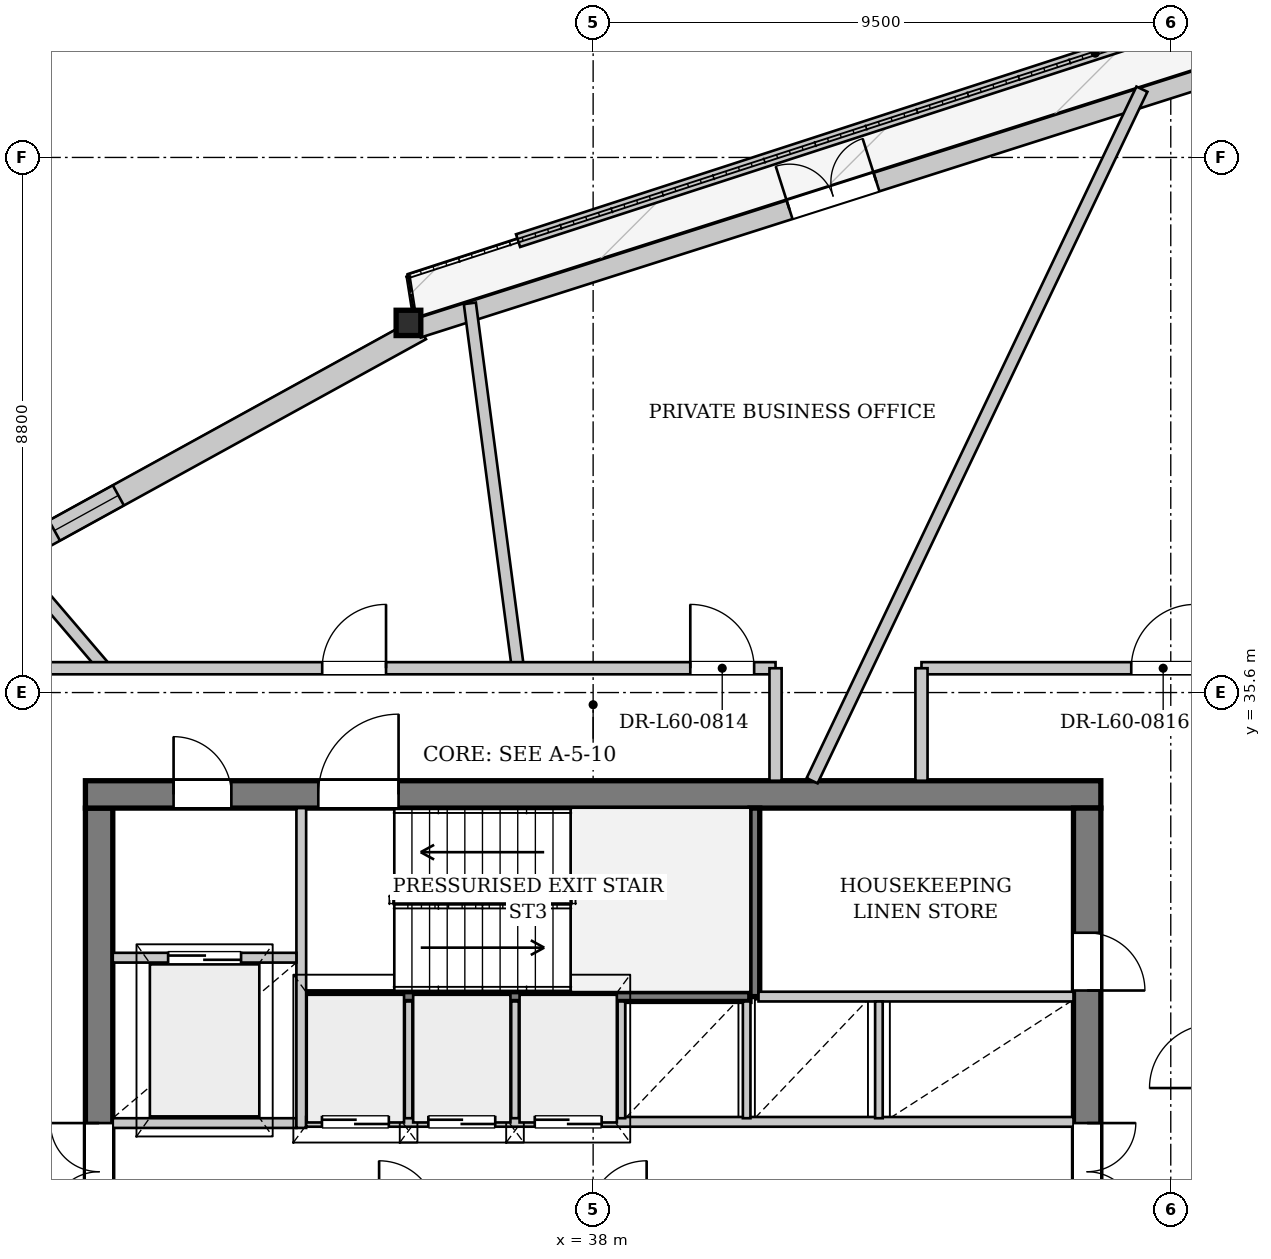
"""IFC4 building model, lengths in metres.
Left out: names, types, materials, properties, quantities, classifications, styles, units other than length and angle.
Written with IfcOpenShell. Run it as: python <this file> out.ifc"""

import sys

from ifc_helpers import new_model, si_unit, direction, frame, frame_2d, origin, origin_2d, place, context, subcontext, project, spatial, rectangle, i_section, extrude, source, transform, mapped, element, fill, save


model = new_model("IFC4")
c1 = context("Model", 3, precision=1e-05, world=origin(), true_north=direction((0.0, 1.0)))
c2 = subcontext(c1, "Body", "Model", "MODEL_VIEW")
j1 = project(units=[si_unit("LENGTHUNIT", "METRE"), si_unit("PLANEANGLEUNIT", "RADIAN")], contexts=[c1])
p1 = place(None, origin())
s1 = spatial("IfcSite", under=j1, at=p1, CompositionType="ELEMENT")
p2 = place(p1, origin())
s2 = spatial("IfcBuilding", under=s1, at=p2, CompositionType="ELEMENT")
p3 = place(p2, frame((0.0, 0.0, 227.35)))
s3 = spatial("IfcBuildingStorey", under=s2, at=p3, CompositionType="ELEMENT", Elevation=227.35)
m1 = source(origin(), c2, "Body", "SweptSolid", [
    extrude(i_section(OverallWidth=0.406, OverallDepth=0.416, WebThickness=0.027, FlangeThickness=0.042, at=origin_2d()), origin(), (0.0, 0.0, 1.0), 3.394),
])
p4 = place(p3, frame((35.068, 41.744, 0.0), z_axis=(-0.062077161408, -0.038339660522, 0.997334696309), x_axis=(0.525471891343, -0.85081096103, 0.0)))
e1 = element("IfcColumn", 1, at=p4, inside=s3, PredefinedType="COLUMN", context=c2, shape_type="MappedRepresentation", body=[
    mapped(m1, transform((0.0, 0.0, 0.0), x_axis=(1.0, 0.0, 0.0), y_axis=(0.0, 1.0, 0.0), z_axis=(0.0, 0.0, 1.0), scale=1.0)),
])
p5 = place(p3, frame((15.539, 30.776, 0.0), z_axis=(0.0, 0.0, 1.0), x_axis=(0.876021364286, 0.482272297892, 0.0)))
e2 = element("IfcWall", 2, at=p5, inside=s3, PredefinedType="SOLIDWALL", context=c2, shape_type="SweptSolid", body=[
    extrude(rectangle(XDim=22.397, YDim=0.38, at=frame_2d((11.199, 0.0))), origin(), (0.0, 0.0, 1.0), 2.822),
])
p6 = place(p5, frame((5.671, 0.0, 0.65)))
e3 = element("IfcOpeningElement", 3, at=p6, cuts=e2, PredefinedType="OPENING", context=c2, shape_type="SweptSolid", body=[
    extrude(rectangle(XDim=1.2, YDim=1.5, at=frame_2d((0.6, 0.75))), frame((0.0, 0.2, 0.0), z_axis=(0.0, -1.0, 0.0), x_axis=(1.0, 0.0, 0.0)), (0.0, 0.0, 1.0), 0.4),
])
p7 = place(p5, frame((15.526, 0.0, 0.65)))
e4 = element("IfcOpeningElement", 4, at=p7, cuts=e2, PredefinedType="OPENING", context=c2, shape_type="SweptSolid", body=[
    extrude(rectangle(XDim=1.2, YDim=1.5, at=frame_2d((0.6, 0.75))), frame((0.0, 0.2, 0.0), z_axis=(0.0, -1.0, 0.0), x_axis=(1.0, 0.0, 0.0)), (0.0, 0.0, 1.0), 0.4),
])
p8 = place(p3, frame((35.117, 41.592, 0.0), z_axis=(0.0, 0.0, 1.0), x_axis=(0.952805881392, 0.303580223968, 0.0)))
e5 = element("IfcWall", 5, at=p8, inside=s3, PredefinedType="SOLIDWALL", context=c2, shape_type="SweptSolid", body=[
    extrude(rectangle(XDim=22.397, YDim=0.32, at=frame_2d((11.199, 0.0))), origin(), (0.0, 0.0, 1.0), 2.822),
])
p9 = place(p8, frame((6.417, 0.0, 0.0)))
e6 = element("IfcOpeningElement", 6, at=p9, cuts=e5, PredefinedType="OPENING", context=c2, shape_type="SweptSolid", body=[
    extrude(rectangle(XDim=1.5, YDim=2.3, at=frame_2d((0.75, 1.15))), frame((0.0, 0.17, 0.0), z_axis=(0.0, -1.0, 0.0), x_axis=(1.0, 0.0, 0.0)), (0.0, 0.0, 1.0), 0.34),
])
p10 = place(p8, frame((15.274, 0.0, 0.352)))
e7 = element("IfcOpeningElement", 7, at=p10, cuts=e5, PredefinedType="OPENING", context=c2, shape_type="SweptSolid", body=[
    extrude(rectangle(XDim=2.6, YDim=2.35, at=frame_2d((1.3, 1.175))), frame((0.0, 0.17, 0.0), z_axis=(0.0, -1.0, 0.0), x_axis=(1.0, 0.0, 0.0)), (0.0, 0.0, 1.0), 0.34),
])
p11 = place(p3, frame((55.749, 49.198, 0.0), z_axis=(0.0, 0.0, 1.0), x_axis=(-0.951088076276, -0.308919845859, 0.0)))
e8 = element("IfcWall", 8, at=p11, inside=s3, PredefinedType="PARAPET", context=c2, shape_type="SweptSolid", body=[
    extrude(rectangle(XDim=19.96, YDim=0.22, at=frame_2d((9.98, 0.0))), origin(), (0.0, 0.0, 1.0), 0.3),
])
p12 = place(p3, frame((29.875, 19.5, 0.0), z_axis=(0.0, 0.0, 1.0), x_axis=(0.0, 1.0, 0.0)))
e9 = element("IfcWall", 9, at=p12, inside=s3, PredefinedType="SHEAR", context=c2, shape_type="SweptSolid", body=[
    extrude(rectangle(XDim=14.2, YDim=0.45, at=frame_2d((7.1, 0.0))), origin(), (0.0, 0.0, 1.0), 3.33),
])
p13 = place(p12, frame((7.42, 0.0, 0.0)))
e10 = element("IfcOpeningElement", 10, at=p13, cuts=e9, PredefinedType="OPENING", context=c2, shape_type="SweptSolid", body=[
    extrude(rectangle(XDim=1.6, YDim=2.2, at=frame_2d((0.8, 1.1))), frame((0.0, 0.235, 0.0), z_axis=(0.0, -1.0, 0.0), x_axis=(1.0, 0.0, 0.0)), (0.0, 0.0, 1.0), 0.47),
])
p14 = place(p3, frame((29.65, 33.925, 0.0), z_axis=(0.0, 0.0, 1.0), x_axis=(1.0, 0.0, 0.0)))
e11 = element("IfcWall", 11, at=p14, inside=s3, PredefinedType="SHEAR", context=c2, shape_type="SweptSolid", body=[
    extrude(rectangle(XDim=16.7, YDim=0.45, at=frame_2d((8.35, 0.0))), origin(), (0.0, 0.0, 1.0), 3.33),
])
p15 = place(p14, frame((1.45, 0.0, 0.0)))
e12 = element("IfcOpeningElement", 12, at=p15, cuts=e11, PredefinedType="OPENING", context=c2, shape_type="SweptSolid", body=[
    extrude(rectangle(XDim=0.95, YDim=2.1, at=frame_2d((0.475, 1.05))), frame((0.0, 0.235, 0.0), z_axis=(0.0, -1.0, 0.0), x_axis=(1.0, 0.0, 0.0)), (0.0, 0.0, 1.0), 0.47),
])
p16 = place(p14, frame((3.83, 0.0, 0.0)))
e13 = element("IfcOpeningElement", 13, at=p16, cuts=e11, PredefinedType="OPENING", context=c2, shape_type="SweptSolid", body=[
    extrude(rectangle(XDim=1.32, YDim=2.2, at=frame_2d((0.66, 1.1))), frame((0.0, 0.235, 0.0), z_axis=(0.0, -1.0, 0.0), x_axis=(1.0, 0.0, 0.0)), (0.0, 0.0, 1.0), 0.47),
])
p17 = place(p3, frame((46.125, 33.7, 0.0), z_axis=(0.0, 0.0, 1.0), x_axis=(0.0, -1.0, 0.0)))
e14 = element("IfcWall", 14, at=p17, inside=s3, PredefinedType="SHEAR", context=c2, shape_type="SweptSolid", body=[
    extrude(rectangle(XDim=14.2, YDim=0.45, at=frame_2d((7.1, 0.0))), origin(), (0.0, 0.0, 1.0), 3.33),
])
p18 = place(p17, frame((5.18, 0.0, 0.0)))
e15 = element("IfcOpeningElement", 15, at=p18, cuts=e14, PredefinedType="OPENING", context=c2, shape_type="SweptSolid", body=[
    extrude(rectangle(XDim=1.6, YDim=2.2, at=frame_2d((0.8, 1.1))), frame((0.0, 0.235, 0.0), z_axis=(0.0, -1.0, 0.0), x_axis=(1.0, 0.0, 0.0)), (0.0, 0.0, 1.0), 0.47),
])
p19 = place(p17, frame((2.05, 0.0, 0.0)))
e16 = element("IfcOpeningElement", 16, at=p19, cuts=e14, PredefinedType="OPENING", context=c2, shape_type="SweptSolid", body=[
    extrude(rectangle(XDim=0.95, YDim=2.1, at=frame_2d((0.475, 1.05))), frame((0.0, 0.235, 0.0), z_axis=(0.0, -1.0, 0.0), x_axis=(1.0, 0.0, 0.0)), (0.0, 0.0, 1.0), 0.47),
])
p20 = place(p3, frame((33.28, 30.6, 0.0), z_axis=(0.0, 0.0, 1.0), x_axis=(1.0, 0.0, 0.0)))
e17 = element("IfcWall", 17, at=p20, inside=s3, PredefinedType="PARTITIONING", context=c2, shape_type="SweptSolid", body=[
    extrude(rectangle(XDim=7.3, YDim=0.16, at=frame_2d((3.65, 0.0))), origin(), (0.0, 0.0, 1.0), 3.33),
])
p21 = place(p3, frame((40.66, 30.6, 0.0), z_axis=(0.0, 0.0, 1.0), x_axis=(0.0, 1.0, 0.0)))
e18 = element("IfcWall", 18, at=p21, inside=s3, PredefinedType="PARTITIONING", context=c2, shape_type="SweptSolid", body=[
    extrude(rectangle(XDim=3.1, YDim=0.16, at=frame_2d((1.55, 0.0))), origin(), (0.0, 0.0, 1.0), 3.33),
])
p22 = place(p3, frame((30.1, 28.52, 0.0), z_axis=(0.0, 0.0, 1.0), x_axis=(1.0, 0.0, 0.0)))
e19 = element("IfcWall", 19, at=p22, inside=s3, PredefinedType="PARTITIONING", context=c2, shape_type="SweptSolid", body=[
    extrude(rectangle(XDim=3.02, YDim=0.16, at=frame_2d((1.51, 0.0))), origin(), (0.0, 0.0, 1.0), 3.33),
])
p23 = place(p3, frame((33.2, 28.44, 0.0), z_axis=(0.0, 0.0, 1.0), x_axis=(0.0, 1.0, 0.0)))
e20 = element("IfcWall", 20, at=p23, inside=s3, PredefinedType="PARTITIONING", context=c2, shape_type="SweptSolid", body=[
    extrude(rectangle(XDim=5.26, YDim=0.16, at=frame_2d((2.63, 0.0))), origin(), (0.0, 0.0, 1.0), 3.33),
])
p24 = place(p3, frame((30.1, 31.24, 0.0), z_axis=(0.0, 0.0, 1.0), x_axis=(1.0, 0.0, 0.0)))
e21 = element("IfcWall", 21, at=p24, inside=s3, PredefinedType="PARTITIONING", context=c2, shape_type="SweptSolid", body=[
    extrude(rectangle(XDim=3.02, YDim=0.16, at=frame_2d((1.51, 0.0))), origin(), (0.0, 0.0, 1.0), 3.33),
])
p25 = place(p24, frame((0.91, 0.0, 0.0)))
e22 = element("IfcOpeningElement", 22, at=p25, cuts=e21, PredefinedType="OPENING", context=c2, shape_type="SweptSolid", body=[
    extrude(rectangle(XDim=1.2, YDim=2.2, at=frame_2d((0.6, 1.1))), frame((0.0, 0.09, 0.0), z_axis=(0.0, -1.0, 0.0), x_axis=(1.0, 0.0, 0.0)), (0.0, 0.0, 1.0), 0.18),
])
p26 = place(p3, frame((33.28, 28.54, 0.0), z_axis=(0.0, 0.0, 1.0), x_axis=(1.0, 0.0, 0.0)))
e23 = element("IfcWall", 23, at=p26, inside=s3, PredefinedType="PARTITIONING", context=c2, shape_type="SweptSolid", body=[
    extrude(rectangle(XDim=12.62, YDim=0.16, at=frame_2d((6.31, 0.0))), origin(), (0.0, 0.0, 1.0), 3.33),
])
p27 = place(p26, frame((0.26, 0.0, 0.0)))
e24 = element("IfcOpeningElement", 24, at=p27, cuts=e23, PredefinedType="OPENING", context=c2, shape_type="SweptSolid", body=[
    extrude(rectangle(XDim=1.1, YDim=2.2, at=frame_2d((0.55, 1.1))), frame((0.0, 0.09, 0.0), z_axis=(0.0, -1.0, 0.0), x_axis=(1.0, 0.0, 0.0)), (0.0, 0.0, 1.0), 0.18),
])
p28 = place(p26, frame((2.01, 0.0, 0.0)))
e25 = element("IfcOpeningElement", 25, at=p28, cuts=e23, PredefinedType="OPENING", context=c2, shape_type="SweptSolid", body=[
    extrude(rectangle(XDim=1.1, YDim=2.2, at=frame_2d((0.55, 1.1))), frame((0.0, 0.09, 0.0), z_axis=(0.0, -1.0, 0.0), x_axis=(1.0, 0.0, 0.0)), (0.0, 0.0, 1.0), 0.18),
])
p29 = place(p26, frame((3.76, 0.0, 0.0)))
e26 = element("IfcOpeningElement", 26, at=p29, cuts=e23, PredefinedType="OPENING", context=c2, shape_type="SweptSolid", body=[
    extrude(rectangle(XDim=1.1, YDim=2.2, at=frame_2d((0.55, 1.1))), frame((0.0, 0.09, 0.0), z_axis=(0.0, -1.0, 0.0), x_axis=(1.0, 0.0, 0.0)), (0.0, 0.0, 1.0), 0.18),
])
p30 = place(p3, frame((40.72, 30.6, 0.0), z_axis=(0.0, 0.0, 1.0), x_axis=(1.0, 0.0, 0.0)))
e27 = element("IfcWall", 27, at=p30, inside=s3, PredefinedType="PARTITIONING", context=c2, shape_type="SweptSolid", body=[
    extrude(rectangle(XDim=5.18, YDim=0.16, at=frame_2d((2.59, 0.0))), origin(), (0.0, 0.0, 1.0), 3.33),
])
for number, where, z_axis, x_axis in (
    (28, (34.965, 28.6, 0.0), (0.0, 0.0, 1.0), (0.0, 1.0, 0.0)),
    (29, (36.715, 28.6, 0.0), (0.0, 0.0, 1.0), (0.0, 1.0, 0.0)),
    (30, (38.465, 28.6, 0.0), (0.0, 0.0, 1.0), (0.0, 1.0, 0.0)),
    (31, (40.525, 28.6, 0.0), (0.0, 0.0, 1.0), (0.0, 1.0, 0.0)),
    (32, (42.7, 28.6, 0.0), (0.0, 0.0, 1.0), (0.0, 1.0, 0.0)),
):
    element("IfcWall", number, at=place(p3, frame(where, z_axis=z_axis, x_axis=x_axis)), inside=s3, PredefinedType="PARTITIONING", context=c2, shape_type="SweptSolid", body=[
        extrude(rectangle(XDim=1.92, YDim=0.125, at=frame_2d((0.96, 0.0))), origin(), (0.0, 0.0, 1.0), 3.33),
    ])
p31 = place(p3, frame((41.601, 34.15, 0.0), z_axis=(0.0, 0.0, 1.0), x_axis=(0.430503610469, 0.902588855112, 0.0)))
e33 = element("IfcWall", 33, at=p31, inside=s3, PredefinedType="PARTITIONING", context=c2, shape_type="SweptSolid", body=[
    extrude(rectangle(XDim=12.6, YDim=0.2, at=frame_2d((6.3, 0.0))), origin(), (0.0, 0.0, 1.0), 3.33),
])
p32 = place(p3, frame((36.762, 36.0, 0.0), z_axis=(0.0, 0.0, 1.0), x_axis=(-0.130530683029, 0.991444270137, 0.0)))
e34 = element("IfcWall", 34, at=p32, inside=s3, PredefinedType="PARTITIONING", context=c2, shape_type="SweptSolid", body=[
    extrude(rectangle(XDim=6.052, YDim=0.2, at=frame_2d((3.026, 0.0))), origin(), (0.0, 0.0, 1.0), 3.33),
])
p33 = place(p3, frame((29.972, 36.0, 0.0), z_axis=(0.0, 0.0, 1.0), x_axis=(-0.649428113656, 0.760422990968, 0.0)))
e35 = element("IfcWall", 35, at=p33, inside=s3, PredefinedType="PARTITIONING", context=c2, shape_type="SweptSolid", body=[
    extrude(rectangle(XDim=2.598, YDim=0.2, at=frame_2d((1.299, 0.0))), origin(), (0.0, 0.0, 1.0), 3.33),
])
p34 = place(p3, frame((27.8, 36.0, 0.0), z_axis=(0.0, 0.0, 1.0), x_axis=(1.0, 0.0, 0.0)))
e36 = element("IfcWall", 36, at=p34, inside=s3, PredefinedType="PARTITIONING", context=c2, shape_type="SweptSolid", body=[
    extrude(rectangle(XDim=13.2, YDim=0.2, at=frame_2d((6.6, 0.0))), origin(), (0.0, 0.0, 1.0), 3.33),
])
p35 = place(p34, frame((11.798, 0.0, 0.0)))
e37 = element("IfcOpeningElement", 37, at=p35, cuts=e36, PredefinedType="OPENING", context=c2, shape_type="SweptSolid", body=[
    extrude(rectangle(XDim=1.05, YDim=2.2, at=frame_2d((0.525, 1.1))), frame((0.0, 0.11, 0.0), z_axis=(0.0, -1.0, 0.0), x_axis=(1.0, 0.0, 0.0)), (0.0, 0.0, 1.0), 0.22),
])
p36 = place(p34, frame((5.744, 0.0, 0.0)))
e38 = element("IfcOpeningElement", 38, at=p36, cuts=e36, PredefinedType="OPENING", context=c2, shape_type="SweptSolid", body=[
    extrude(rectangle(XDim=1.05, YDim=2.2, at=frame_2d((0.525, 1.1))), frame((0.0, 0.11, 0.0), z_axis=(0.0, -1.0, 0.0), x_axis=(1.0, 0.0, 0.0)), (0.0, 0.0, 1.0), 0.22),
])
p37 = place(p3, frame((41.0, 34.15, 0.0), z_axis=(0.0, 0.0, 1.0), x_axis=(0.0, 1.0, 0.0)))
e39 = element("IfcWall", 39, at=p37, inside=s3, PredefinedType="PARTITIONING", context=c2, shape_type="SweptSolid", body=[
    extrude(rectangle(XDim=1.85, YDim=0.2, at=frame_2d((0.925, 0.0))), origin(), (0.0, 0.0, 1.0), 3.33),
])
p38 = place(p3, frame((43.4, 36.0, 0.0), z_axis=(0.0, 0.0, 1.0), x_axis=(1.0, 0.0, 0.0)))
e40 = element("IfcWall", 40, at=p38, inside=s3, PredefinedType="PARTITIONING", context=c2, shape_type="SweptSolid", body=[
    extrude(rectangle(XDim=4.8, YDim=0.2, at=frame_2d((2.4, 0.0))), origin(), (0.0, 0.0, 1.0), 3.33),
])
p39 = place(p38, frame((3.45, 0.0, 0.0)))
e41 = element("IfcOpeningElement", 41, at=p39, cuts=e40, PredefinedType="OPENING", context=c2, shape_type="SweptSolid", body=[
    extrude(rectangle(XDim=1.05, YDim=2.2, at=frame_2d((0.525, 1.1))), frame((0.0, 0.11, 0.0), z_axis=(0.0, -1.0, 0.0), x_axis=(1.0, 0.0, 0.0)), (0.0, 0.0, 1.0), 0.22),
])
p40 = place(p3, frame((43.4, 34.15, 0.0), z_axis=(0.0, 0.0, 1.0), x_axis=(0.0, 1.0, 0.0)))
e42 = element("IfcWall", 42, at=p40, inside=s3, PredefinedType="PARTITIONING", context=c2, shape_type="SweptSolid", body=[
    extrude(rectangle(XDim=1.85, YDim=0.2, at=frame_2d((0.925, 0.0))), origin(), (0.0, 0.0, 1.0), 3.33),
])
m2 = source(origin(), c2, "Body", "SweptSolid", [
    extrude(rectangle(XDim=1.2, YDim=1.5, at=frame_2d((0.6, 0.75))), frame((0.0, 0.03, 0.0), z_axis=(0.0, -1.0, 0.0), x_axis=(1.0, 0.0, 0.0)), (0.0, 0.0, 1.0), 0.06),
])
p41 = place(p7, origin())
e43 = element("IfcWindow", 43, at=p41, inside=s3, PartitioningType="SINGLE_PANEL", PredefinedType="WINDOW", context=c2, shape_type="MappedRepresentation", body=[
    mapped(m2, transform((0.0, 0.0, 0.0), x_axis=(1.0, 0.0, 0.0), y_axis=(0.0, 1.0, 0.0), z_axis=(0.0, 0.0, 1.0), scale=1.0)),
])
fill(e4, e43)
m3 = source(origin(), c2, "Body", "SweptSolid", [
    extrude(rectangle(XDim=1.5, YDim=2.3, at=frame_2d((0.75, 1.15))), frame((0.0, 0.025, 0.0), z_axis=(0.0, -1.0, 0.0), x_axis=(1.0, 0.0, 0.0)), (0.0, 0.0, 1.0), 0.05),
])
p42 = place(p9, origin())
e44 = element("IfcDoor", 44, at=p42, inside=s3, OperationType="DOUBLE_DOOR_SINGLE_SWING", PredefinedType="DOOR", context=c2, shape_type="MappedRepresentation", body=[
    mapped(m3, transform((0.0, 0.0, 0.0), x_axis=(1.0, 0.0, 0.0), y_axis=(0.0, 1.0, 0.0), z_axis=(0.0, 0.0, 1.0), scale=1.0)),
])
fill(e6, e44)
m4 = source(origin(), c2, "Body", "SweptSolid", [
    extrude(rectangle(XDim=1.6, YDim=2.2, at=frame_2d((0.8, 1.1))), frame((0.0, 0.025, 0.0), z_axis=(0.0, -1.0, 0.0), x_axis=(1.0, 0.0, 0.0)), (0.0, 0.0, 1.0), 0.05),
])
p43 = place(p13, origin())
e45 = element("IfcDoor", 45, at=p43, inside=s3, OperationType="DOUBLE_DOOR_SINGLE_SWING", PredefinedType="DOOR", context=c2, shape_type="MappedRepresentation", body=[
    mapped(m4, transform((0.0, 0.0, 0.0), x_axis=(1.0, 0.0, 0.0), y_axis=(0.0, 1.0, 0.0), z_axis=(0.0, 0.0, 1.0), scale=1.0)),
])
fill(e10, e45)
m5 = source(origin(), c2, "Body", "SweptSolid", [
    extrude(rectangle(XDim=0.95, YDim=2.1, at=frame_2d((0.475, 1.05))), frame((0.0, 0.025, 0.0), z_axis=(0.0, -1.0, 0.0), x_axis=(1.0, 0.0, 0.0)), (0.0, 0.0, 1.0), 0.05),
])
p44 = place(p15, origin())
e46 = element("IfcDoor", 46, at=p44, inside=s3, OperationType="SINGLE_SWING_LEFT", PredefinedType="DOOR", context=c2, shape_type="MappedRepresentation", body=[
    mapped(m5, transform((0.0, 0.0, 0.0), x_axis=(1.0, 0.0, 0.0), y_axis=(0.0, 1.0, 0.0), z_axis=(0.0, 0.0, 1.0), scale=1.0)),
])
fill(e12, e46)
m6 = source(origin(), c2, "Body", "SweptSolid", [
    extrude(rectangle(XDim=1.32, YDim=2.2, at=frame_2d((0.66, 1.1))), frame((0.0, 0.025, 0.0), z_axis=(0.0, -1.0, 0.0), x_axis=(1.0, 0.0, 0.0)), (0.0, 0.0, 1.0), 0.05),
])
p45 = place(p16, origin())
e47 = element("IfcDoor", 47, at=p45, inside=s3, OperationType="SINGLE_SWING_RIGHT", PredefinedType="DOOR", context=c2, shape_type="MappedRepresentation", body=[
    mapped(m6, transform((0.0, 0.0, 0.0), x_axis=(1.0, 0.0, 0.0), y_axis=(0.0, 1.0, 0.0), z_axis=(0.0, 0.0, 1.0), scale=1.0)),
])
fill(e13, e47)
p46 = place(p18, origin())
e48 = element("IfcDoor", 48, at=p46, inside=s3, OperationType="DOUBLE_DOOR_SINGLE_SWING", PredefinedType="DOOR", context=c2, shape_type="MappedRepresentation", body=[
    mapped(m4, transform((0.0, 0.0, 0.0), x_axis=(1.0, 0.0, 0.0), y_axis=(0.0, 1.0, 0.0), z_axis=(0.0, 0.0, 1.0), scale=1.0)),
])
fill(e15, e48)
m7 = source(origin(), c2, "Body", "SweptSolid", [
    extrude(rectangle(XDim=1.2, YDim=2.2, at=frame_2d((0.6, 1.1))), frame((0.0, 0.025, 0.0), z_axis=(0.0, -1.0, 0.0), x_axis=(1.0, 0.0, 0.0)), (0.0, 0.0, 1.0), 0.05),
])
p47 = place(p25, origin())
e49 = element("IfcDoor", 49, at=p47, inside=s3, OperationType="DOUBLE_DOOR_SLIDING", PredefinedType="DOOR", context=c2, shape_type="MappedRepresentation", body=[
    mapped(m7, transform((0.0, 0.0, 0.0), x_axis=(1.0, 0.0, 0.0), y_axis=(0.0, 1.0, 0.0), z_axis=(0.0, 0.0, 1.0), scale=1.0)),
])
fill(e22, e49)
m8 = source(origin(), c2, "Body", "SweptSolid", [
    extrude(rectangle(XDim=1.1, YDim=2.2, at=frame_2d((0.55, 1.1))), frame((0.0, 0.025, 0.0), z_axis=(0.0, -1.0, 0.0), x_axis=(1.0, 0.0, 0.0)), (0.0, 0.0, 1.0), 0.05),
])
p48 = place(p27, origin())
e50 = element("IfcDoor", 50, at=p48, inside=s3, OperationType="DOUBLE_DOOR_SLIDING", PredefinedType="DOOR", context=c2, shape_type="MappedRepresentation", body=[
    mapped(m8, transform((0.0, 0.0, 0.0), x_axis=(1.0, 0.0, 0.0), y_axis=(0.0, 1.0, 0.0), z_axis=(0.0, 0.0, 1.0), scale=1.0)),
])
fill(e24, e50)
p49 = place(p28, origin())
e51 = element("IfcDoor", 51, at=p49, inside=s3, OperationType="DOUBLE_DOOR_SLIDING", PredefinedType="DOOR", context=c2, shape_type="MappedRepresentation", body=[
    mapped(m8, transform((0.0, 0.0, 0.0), x_axis=(1.0, 0.0, 0.0), y_axis=(0.0, 1.0, 0.0), z_axis=(0.0, 0.0, 1.0), scale=1.0)),
])
fill(e25, e51)
p50 = place(p29, origin())
e52 = element("IfcDoor", 52, at=p50, inside=s3, OperationType="DOUBLE_DOOR_SLIDING", PredefinedType="DOOR", context=c2, shape_type="MappedRepresentation", body=[
    mapped(m8, transform((0.0, 0.0, 0.0), x_axis=(1.0, 0.0, 0.0), y_axis=(0.0, 1.0, 0.0), z_axis=(0.0, 0.0, 1.0), scale=1.0)),
])
fill(e26, e52)
p51 = place(p19, origin())
e53 = element("IfcDoor", 53, at=p51, inside=s3, OperationType="SINGLE_SWING_RIGHT", PredefinedType="DOOR", context=c2, shape_type="MappedRepresentation", body=[
    mapped(m5, transform((0.0, 0.0, 0.0), x_axis=(1.0, 0.0, 0.0), y_axis=(0.0, 1.0, 0.0), z_axis=(0.0, 0.0, 1.0), scale=1.0)),
])
fill(e16, e53)
m9 = source(origin(), c2, "Body", "SweptSolid", [
    extrude(rectangle(XDim=1.05, YDim=2.2, at=frame_2d((0.525, 1.1))), frame((0.0, 0.025, 0.0), z_axis=(0.0, -1.0, 0.0), x_axis=(1.0, 0.0, 0.0)), (0.0, 0.0, 1.0), 0.05),
])
p52 = place(p35, origin())
e54 = element("IfcDoor", 54, at=p52, inside=s3, OperationType="SINGLE_SWING_LEFT", PredefinedType="DOOR", context=c2, shape_type="MappedRepresentation", body=[
    mapped(m9, transform((0.0, 0.0, 0.0), x_axis=(1.0, 0.0, 0.0), y_axis=(0.0, 1.0, 0.0), z_axis=(0.0, 0.0, 1.0), scale=1.0)),
])
fill(e37, e54)
p53 = place(p36, origin())
e55 = element("IfcDoor", 55, at=p53, inside=s3, OperationType="SINGLE_SWING_RIGHT", PredefinedType="DOOR", context=c2, shape_type="MappedRepresentation", body=[
    mapped(m9, transform((0.0, 0.0, 0.0), x_axis=(1.0, 0.0, 0.0), y_axis=(0.0, 1.0, 0.0), z_axis=(0.0, 0.0, 1.0), scale=1.0)),
])
fill(e38, e55)
p54 = place(p39, origin())
e56 = element("IfcDoor", 56, at=p54, inside=s3, OperationType="SINGLE_SWING_RIGHT", PredefinedType="DOOR", context=c2, shape_type="MappedRepresentation", body=[
    mapped(m9, transform((0.0, 0.0, 0.0), x_axis=(1.0, 0.0, 0.0), y_axis=(0.0, 1.0, 0.0), z_axis=(0.0, 0.0, 1.0), scale=1.0)),
])
fill(e41, e56)
save(model, sys.argv[1])
